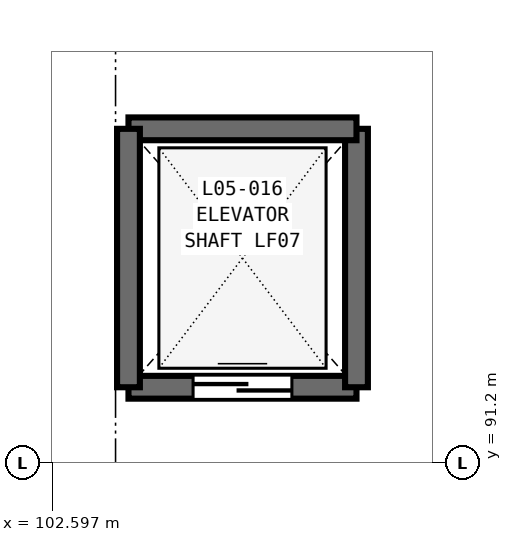
"""IFC4 building model, lengths in metres.
Left out: names, types, materials, properties, quantities, classifications, styles, units other than length and angle.
Written with IfcOpenShell. Run it as: python <this file> out.ifc"""

import sys

from ifc_helpers import new_model, si_unit, direction, frame, frame_2d, origin, place, context, subcontext, project, spatial, rectangle, extrude, element, fill, save


model = new_model("IFC4")
c1 = context("Model", 3, precision=1e-05, world=origin(), true_north=direction((0.0, 1.0)))
c2 = subcontext(c1, "Body", "Model", "MODEL_VIEW")
j1 = project(units=[si_unit("LENGTHUNIT", "METRE"), si_unit("PLANEANGLEUNIT", "RADIAN")], contexts=[c1])
p1 = place(None, origin())
s1 = spatial("IfcSite", under=j1, at=p1, CompositionType="ELEMENT")
p2 = place(p1, origin())
s2 = spatial("IfcBuilding", under=s1, at=p2, CompositionType="ELEMENT")
p3 = place(p2, frame((0.0, 0.0, 24.6)))
s3 = spatial("IfcBuildingStorey", under=s2, at=p3, CompositionType="ELEMENT", Elevation=24.6)
p4 = place(p3, frame((103.6, 92.2, 0.0), z_axis=(0.0, 0.0, 1.0), x_axis=(1.0, 0.0, 0.0)))
e1 = element("IfcWall", 1, at=p4, inside=s3, PredefinedType="SHEAR", context=c2, shape_type="SweptSolid", body=[
    extrude(rectangle(XDim=3.0, YDim=0.3, at=frame_2d((1.5, 0.0))), origin(), (0.0, 0.0, 1.0), 4.2),
])
p5 = place(p4, frame((0.85, 0.0, 0.0)))
e2 = element("IfcOpeningElement", 2, at=p5, cuts=e1, PredefinedType="OPENING", context=c2, shape_type="SweptSolid", body=[
    extrude(rectangle(XDim=1.3, YDim=2.2, at=frame_2d((0.65, 1.1))), frame((0.0, 0.16, 0.0), z_axis=(0.0, -1.0, 0.0), x_axis=(1.0, 0.0, 0.0)), (0.0, 0.0, 1.0), 0.32),
])
p6 = place(p3, frame((106.6, 92.2, 0.0), z_axis=(0.0, 0.0, 1.0), x_axis=(0.0, 1.0, 0.0)))
e3 = element("IfcWall", 3, at=p6, inside=s3, PredefinedType="SHEAR", context=c2, shape_type="SweptSolid", body=[
    extrude(rectangle(XDim=3.4, YDim=0.3, at=frame_2d((1.7, 0.0))), origin(), (0.0, 0.0, 1.0), 4.2),
])
p7 = place(p3, frame((106.6, 95.6, 0.0), z_axis=(0.0, 0.0, 1.0), x_axis=(-1.0, 0.0, 0.0)))
e4 = element("IfcWall", 4, at=p7, inside=s3, PredefinedType="SHEAR", context=c2, shape_type="SweptSolid", body=[
    extrude(rectangle(XDim=3.0, YDim=0.3, at=frame_2d((1.5, 0.0))), origin(), (0.0, 0.0, 1.0), 4.2),
])
p8 = place(p3, frame((103.6, 95.6, 0.0), z_axis=(0.0, 0.0, 1.0), x_axis=(0.0, -1.0, 0.0)))
e5 = element("IfcWall", 5, at=p8, inside=s3, PredefinedType="SHEAR", context=c2, shape_type="SweptSolid", body=[
    extrude(rectangle(XDim=3.4, YDim=0.3, at=frame_2d((1.7, 0.0))), origin(), (0.0, 0.0, 1.0), 4.2),
])
p9 = place(p5, origin())
e6 = element("IfcDoor", 6, at=p9, inside=s3, OperationType="DOUBLE_DOOR_SLIDING", PredefinedType="DOOR", context=c2, shape_type="SweptSolid", body=[
    extrude(rectangle(XDim=1.3, YDim=2.2, at=frame_2d((0.65, 1.1))), frame((0.0, 0.025, 0.0), z_axis=(0.0, -1.0, 0.0), x_axis=(1.0, 0.0, 0.0)), (0.0, 0.0, 1.0), 0.05),
])
fill(e2, e6)
save(model, sys.argv[1])
